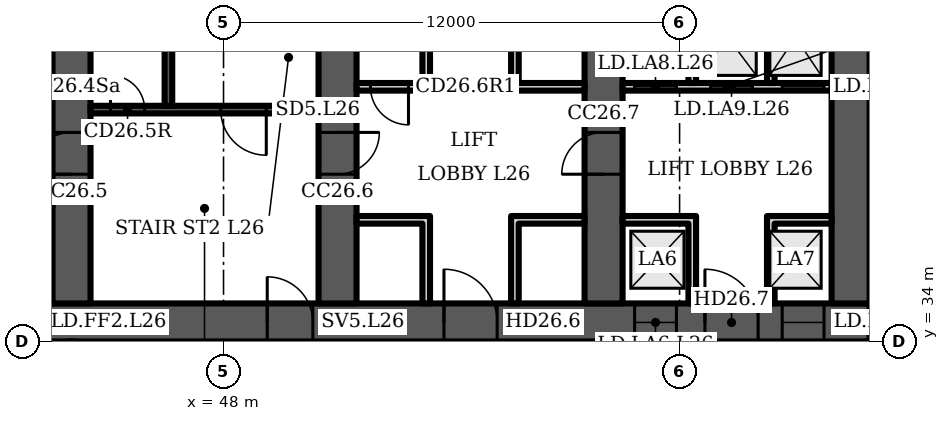
"""IFC4 building model, lengths in metres.
Left out: names, types, materials, properties, quantities, classifications, styles, units other than length and angle.
Written with IfcOpenShell. Run it as: python <this file> out.ifc"""

import sys

from ifc_helpers import new_model, si_unit, direction, frame, frame_2d, origin, place, context, subcontext, project, spatial, polyline, rectangle, outline, extrude, element, fill, save


model = new_model("IFC4")
c1 = context("Model", 3, precision=1e-05, world=origin(), true_north=direction((0.0, 1.0)))
c2 = subcontext(c1, "Body", "Model", "MODEL_VIEW")
j1 = project(units=[si_unit("LENGTHUNIT", "METRE"), si_unit("PLANEANGLEUNIT", "RADIAN")], contexts=[c1])
p1 = place(None, origin())
s1 = spatial("IfcSite", under=j1, at=p1, CompositionType="ELEMENT")
p2 = place(p1, origin())
s2 = spatial("IfcBuilding", under=s1, at=p2, CompositionType="ELEMENT")
p3 = place(p2, frame((0.0, 0.0, 114.7)))
s3 = spatial("IfcBuildingStorey", under=s2, at=p3, CompositionType="ELEMENT", Elevation=114.7)
p4 = place(p3, frame((16.0, 34.5, 0.0), z_axis=(0.0, 0.0, 1.0), x_axis=(1.0, 0.0, 0.0)))
e1 = element("IfcWall", 1, at=p4, inside=s3, PredefinedType="SHEAR", context=c2, shape_type="SweptSolid", body=[
    extrude(rectangle(XDim=49.0, YDim=1.0, at=frame_2d((24.5, 0.0))), origin(), (0.0, 0.0, 1.0), 3.6),
])
p5 = place(p4, frame((1.2, 0.0, 0.0)))
e2 = element("IfcOpeningElement", 2, at=p5, cuts=e1, PredefinedType="OPENING", context=c2, shape_type="SweptSolid", body=[
    extrude(rectangle(XDim=1.1, YDim=2.1, at=frame_2d((0.55, 1.05))), frame((0.0, 0.51, 0.0), z_axis=(0.0, -1.0, 0.0), x_axis=(1.0, 0.0, 0.0)), (0.0, 0.0, 1.0), 1.02),
])
p6 = place(p4, frame((5.083, 0.0, 0.0)))
e3 = element("IfcOpeningElement", 3, at=p6, cuts=e1, PredefinedType="OPENING", context=c2, shape_type="SweptSolid", body=[
    extrude(rectangle(XDim=1.1, YDim=2.1, at=frame_2d((0.55, 1.05))), frame((0.0, 0.51, 0.0), z_axis=(0.0, -1.0, 0.0), x_axis=(1.0, 0.0, 0.0)), (0.0, 0.0, 1.0), 1.02),
])
p7 = place(p4, frame((2.933, 0.0, 0.0)))
e4 = element("IfcOpeningElement", 4, at=p7, cuts=e1, PredefinedType="OPENING", context=c2, shape_type="SweptSolid", body=[
    extrude(rectangle(XDim=1.4, YDim=2.1, at=frame_2d((0.7, 1.05))), frame((0.0, 0.51, 0.0), z_axis=(0.0, -1.0, 0.0), x_axis=(1.0, 0.0, 0.0)), (0.0, 0.0, 1.0), 1.02),
])
p8 = place(p4, frame((7.65, 0.0, 0.0)))
e5 = element("IfcOpeningElement", 5, at=p8, cuts=e1, PredefinedType="OPENING", context=c2, shape_type="SweptSolid", body=[
    extrude(rectangle(XDim=1.2, YDim=2.1, at=frame_2d((0.6, 1.05))), frame((0.0, 0.51, 0.0), z_axis=(0.0, -1.0, 0.0), x_axis=(1.0, 0.0, 0.0)), (0.0, 0.0, 1.0), 1.02),
])
p9 = place(p4, frame((14.817, 0.0, 0.0)))
e6 = element("IfcOpeningElement", 6, at=p9, cuts=e1, PredefinedType="OPENING", context=c2, shape_type="SweptSolid", body=[
    extrude(rectangle(XDim=1.1, YDim=2.1, at=frame_2d((0.55, 1.05))), frame((0.0, 0.51, 0.0), z_axis=(0.0, -1.0, 0.0), x_axis=(1.0, 0.0, 0.0)), (0.0, 0.0, 1.0), 1.02),
])
p10 = place(p4, frame((19.083, 0.0, 0.0)))
e7 = element("IfcOpeningElement", 7, at=p10, cuts=e1, PredefinedType="OPENING", context=c2, shape_type="SweptSolid", body=[
    extrude(rectangle(XDim=1.1, YDim=2.1, at=frame_2d((0.55, 1.05))), frame((0.0, 0.51, 0.0), z_axis=(0.0, -1.0, 0.0), x_axis=(1.0, 0.0, 0.0)), (0.0, 0.0, 1.0), 1.02),
])
p11 = place(p4, frame((16.8, 0.0, 0.0)))
e8 = element("IfcOpeningElement", 8, at=p11, cuts=e1, PredefinedType="OPENING", context=c2, shape_type="SweptSolid", body=[
    extrude(rectangle(XDim=1.4, YDim=2.1, at=frame_2d((0.7, 1.05))), frame((0.0, 0.51, 0.0), z_axis=(0.0, -1.0, 0.0), x_axis=(1.0, 0.0, 0.0)), (0.0, 0.0, 1.0), 1.02),
])
p12 = place(p4, frame((21.817, 0.0, 0.0)))
e9 = element("IfcOpeningElement", 9, at=p12, cuts=e1, PredefinedType="OPENING", context=c2, shape_type="SweptSolid", body=[
    extrude(rectangle(XDim=1.1, YDim=2.1, at=frame_2d((0.55, 1.05))), frame((0.0, 0.51, 0.0), z_axis=(0.0, -1.0, 0.0), x_axis=(1.0, 0.0, 0.0)), (0.0, 0.0, 1.0), 1.02),
])
p13 = place(p4, frame((26.083, 0.0, 0.0)))
e10 = element("IfcOpeningElement", 10, at=p13, cuts=e1, PredefinedType="OPENING", context=c2, shape_type="SweptSolid", body=[
    extrude(rectangle(XDim=1.1, YDim=2.1, at=frame_2d((0.55, 1.05))), frame((0.0, 0.51, 0.0), z_axis=(0.0, -1.0, 0.0), x_axis=(1.0, 0.0, 0.0)), (0.0, 0.0, 1.0), 1.02),
])
p14 = place(p4, frame((33.15, 0.0, 0.0)))
e11 = element("IfcOpeningElement", 11, at=p14, cuts=e1, PredefinedType="OPENING", context=c2, shape_type="SweptSolid", body=[
    extrude(rectangle(XDim=1.2, YDim=2.1, at=frame_2d((0.6, 1.05))), frame((0.0, 0.51, 0.0), z_axis=(0.0, -1.0, 0.0), x_axis=(1.0, 0.0, 0.0)), (0.0, 0.0, 1.0), 1.02),
])
p15 = place(p4, frame((37.8, 0.0, 0.0)))
e12 = element("IfcOpeningElement", 12, at=p15, cuts=e1, PredefinedType="OPENING", context=c2, shape_type="SweptSolid", body=[
    extrude(rectangle(XDim=1.4, YDim=2.1, at=frame_2d((0.7, 1.05))), frame((0.0, 0.51, 0.0), z_axis=(0.0, -1.0, 0.0), x_axis=(1.0, 0.0, 0.0)), (0.0, 0.0, 1.0), 1.02),
])
p16 = place(p4, frame((42.817, 0.0, 0.0)))
e13 = element("IfcOpeningElement", 13, at=p16, cuts=e1, PredefinedType="OPENING", context=c2, shape_type="SweptSolid", body=[
    extrude(rectangle(XDim=1.1, YDim=2.1, at=frame_2d((0.55, 1.05))), frame((0.0, 0.51, 0.0), z_axis=(0.0, -1.0, 0.0), x_axis=(1.0, 0.0, 0.0)), (0.0, 0.0, 1.0), 1.02),
])
p17 = place(p4, frame((46.7, 0.0, 0.0)))
e14 = element("IfcOpeningElement", 14, at=p17, cuts=e1, PredefinedType="OPENING", context=c2, shape_type="SweptSolid", body=[
    extrude(rectangle(XDim=1.1, YDim=2.1, at=frame_2d((0.55, 1.05))), frame((0.0, 0.51, 0.0), z_axis=(0.0, -1.0, 0.0), x_axis=(1.0, 0.0, 0.0)), (0.0, 0.0, 1.0), 1.02),
])
p18 = place(p4, frame((44.667, 0.0, 0.0)))
e15 = element("IfcOpeningElement", 15, at=p18, cuts=e1, PredefinedType="OPENING", context=c2, shape_type="SweptSolid", body=[
    extrude(rectangle(XDim=1.4, YDim=2.1, at=frame_2d((0.7, 1.05))), frame((0.0, 0.51, 0.0), z_axis=(0.0, -1.0, 0.0), x_axis=(1.0, 0.0, 0.0)), (0.0, 0.0, 1.0), 1.02),
])
p19 = place(p3, frame((44.0, 35.0, 0.0), z_axis=(0.0, 0.0, 1.0), x_axis=(0.0, 1.0, 0.0)))
e16 = element("IfcWall", 16, at=p19, inside=s3, PredefinedType="SHEAR", context=c2, shape_type="SweptSolid", body=[
    extrude(rectangle(XDim=14.577, YDim=1.0, at=frame_2d((7.289, 0.0))), origin(), (0.0, 0.0, 1.0), 3.6),
])
p20 = place(p19, frame((3.4, 0.0, 0.0)))
e17 = element("IfcOpeningElement", 17, at=p20, cuts=e16, PredefinedType="OPENING", context=c2, shape_type="SweptSolid", body=[
    extrude(rectangle(XDim=1.1, YDim=2.1, at=frame_2d((0.55, 1.05))), frame((0.0, 0.51, 0.0), z_axis=(0.0, -1.0, 0.0), x_axis=(1.0, 0.0, 0.0)), (0.0, 0.0, 1.0), 1.02),
])
p21 = place(p19, frame((9.8, 0.0, 0.0)))
e18 = element("IfcOpeningElement", 18, at=p21, cuts=e16, PredefinedType="OPENING", context=c2, shape_type="SweptSolid", body=[
    extrude(rectangle(XDim=1.0, YDim=2.1, at=frame_2d((0.5, 1.05))), frame((0.0, 0.51, 0.0), z_axis=(0.0, -1.0, 0.0), x_axis=(1.0, 0.0, 0.0)), (0.0, 0.0, 1.0), 1.02),
])
p22 = place(p3, frame((51.0, 35.0, 0.0), z_axis=(0.0, 0.0, 1.0), x_axis=(0.0, 1.0, 0.0)))
e19 = element("IfcWall", 19, at=p22, inside=s3, PredefinedType="SHEAR", context=c2, shape_type="SweptSolid", body=[
    extrude(rectangle(XDim=13.965, YDim=1.0, at=frame_2d((6.982, 0.0))), origin(), (0.0, 0.0, 1.0), 3.6),
])
p23 = place(p22, frame((3.4, 0.0, 0.0)))
e20 = element("IfcOpeningElement", 20, at=p23, cuts=e19, PredefinedType="OPENING", context=c2, shape_type="SweptSolid", body=[
    extrude(rectangle(XDim=1.1, YDim=2.1, at=frame_2d((0.55, 1.05))), frame((0.0, 0.51, 0.0), z_axis=(0.0, -1.0, 0.0), x_axis=(1.0, 0.0, 0.0)), (0.0, 0.0, 1.0), 1.02),
])
p24 = place(p3, frame((58.0, 35.0, 0.0), z_axis=(0.0, 0.0, 1.0), x_axis=(0.0, 1.0, 0.0)))
e21 = element("IfcWall", 21, at=p24, inside=s3, PredefinedType="SHEAR", context=c2, shape_type="SweptSolid", body=[
    extrude(rectangle(XDim=13.352, YDim=1.0, at=frame_2d((6.676, 0.0))), origin(), (0.0, 0.0, 1.0), 3.6),
])
p25 = place(p24, frame((10.426, 0.0, 0.0)))
e22 = element("IfcOpeningElement", 22, at=p25, cuts=e21, PredefinedType="OPENING", context=c2, shape_type="SweptSolid", body=[
    extrude(rectangle(XDim=1.0, YDim=2.1, at=frame_2d((0.5, 1.05))), frame((0.0, 0.51, 0.0), z_axis=(0.0, -1.0, 0.0), x_axis=(1.0, 0.0, 0.0)), (0.0, 0.0, 1.0), 1.02),
])
p26 = place(p24, frame((3.4, 0.0, 0.0)))
e23 = element("IfcOpeningElement", 23, at=p26, cuts=e21, PredefinedType="OPENING", context=c2, shape_type="SweptSolid", body=[
    extrude(rectangle(XDim=1.1, YDim=2.1, at=frame_2d((0.55, 1.05))), frame((0.0, 0.51, 0.0), z_axis=(0.0, -1.0, 0.0), x_axis=(1.0, 0.0, 0.0)), (0.0, 0.0, 1.0), 1.02),
])
p27 = place(p3, frame((64.5, 35.0, 0.0), z_axis=(0.0, 0.0, 1.0), x_axis=(0.0, 1.0, 0.0)))
e24 = element("IfcWall", 24, at=p27, inside=s3, PredefinedType="SHEAR", context=c2, shape_type="SweptSolid", body=[
    extrude(rectangle(XDim=12.784, YDim=1.0, at=frame_2d((6.392, 0.0))), origin(), (0.0, 0.0, 1.0), 3.6),
])
p28 = place(p3, frame((44.5, 40.1, 0.0), z_axis=(0.0, 0.0, 1.0), x_axis=(1.0, 0.0, 0.0)))
e25 = element("IfcWall", 25, at=p28, inside=s3, PredefinedType="SHEAR", context=c2, shape_type="SweptSolid", body=[
    extrude(rectangle(XDim=6.0, YDim=0.2, at=frame_2d((3.0, 0.0))), origin(), (0.0, 0.0, 1.0), 3.2),
])
p29 = place(p28, frame((3.425, 0.0, 0.0)))
e26 = element("IfcOpeningElement", 26, at=p29, cuts=e25, PredefinedType="OPENING", context=c2, shape_type="SweptSolid", body=[
    extrude(rectangle(XDim=1.2, YDim=2.1, at=frame_2d((0.6, 1.05))), frame((0.0, 0.11, 0.0), z_axis=(0.0, -1.0, 0.0), x_axis=(1.0, 0.0, 0.0)), (0.0, 0.0, 1.0), 0.22),
])
p30 = place(p28, frame((0.525, 0.0, 0.0)))
e27 = element("IfcOpeningElement", 27, at=p30, cuts=e25, PredefinedType="OPENING", context=c2, shape_type="SweptSolid", body=[
    extrude(rectangle(XDim=0.9, YDim=2.1, at=frame_2d((0.45, 1.05))), frame((0.0, 0.11, 0.0), z_axis=(0.0, -1.0, 0.0), x_axis=(1.0, 0.0, 0.0)), (0.0, 0.0, 1.0), 0.22),
])
p31 = place(p3, frame((46.55, 40.2, 0.0), z_axis=(0.0, 0.0, 1.0), x_axis=(0.0, 1.0, 0.0)))
e28 = element("IfcWall", 28, at=p31, inside=s3, PredefinedType="SHEAR", context=c2, shape_type="SweptSolid", body=[
    extrude(rectangle(XDim=7.2, YDim=0.2, at=frame_2d((3.6, 0.0))), origin(), (0.0, 0.0, 1.0), 3.2),
])
p32 = place(p3, frame((51.5, 40.7, 0.0), z_axis=(0.0, 0.0, 1.0), x_axis=(1.0, 0.0, 0.0)))
e29 = element("IfcWall", 29, at=p32, inside=s3, PredefinedType="PARTITIONING", context=c2, shape_type="SweptSolid", body=[
    extrude(rectangle(XDim=6.0, YDim=0.2, at=frame_2d((3.0, 0.0))), origin(), (0.0, 0.0, 1.0), 3.2),
])
p33 = place(p32, frame((0.367, 0.0, 0.0)))
e30 = element("IfcOpeningElement", 30, at=p33, cuts=e29, PredefinedType="OPENING", context=c2, shape_type="SweptSolid", body=[
    extrude(rectangle(XDim=1.0, YDim=2.1, at=frame_2d((0.5, 1.05))), frame((0.0, 0.11, 0.0), z_axis=(0.0, -1.0, 0.0), x_axis=(1.0, 0.0, 0.0)), (0.0, 0.0, 1.0), 0.22),
])
p34 = place(p3, frame((0.0, 0.0, -0.0)))
e31 = element("IfcWall", 31, at=p34, inside=s3, PredefinedType="PARTITIONING", context=c2, shape_type="SweptSolid", body=[
    extrude(outline(polyline([(53.233, 37.1), (51.5, 37.1), (51.5, 37.3), (53.233, 37.3), (53.433, 37.3), (53.433, 35.0), (53.233, 35.0), (53.233, 37.1)])), origin(), (0.0, 0.0, 1.0), 3.2),
])
p35 = place(p3, frame((0.0, 0.0, -0.0)))
e32 = element("IfcWall", 32, at=p35, inside=s3, PredefinedType="PARTITIONING", context=c2, shape_type="SweptSolid", body=[
    extrude(outline(polyline([(55.567, 37.3), (55.767, 37.3), (57.5, 37.3), (57.5, 37.1), (55.767, 37.1), (55.767, 35.0), (55.567, 35.0), (55.567, 37.3)])), origin(), (0.0, 0.0, 1.0), 3.2),
])
p36 = place(p3, frame((0.0, 0.0, -0.0)))
e33 = element("IfcWall", 33, at=p36, inside=s3, PredefinedType="PARTITIONING", context=c2, shape_type="SweptSolid", body=[
    extrude(outline(polyline([(53.233, 40.8), (53.233, 43.8), (53.433, 43.8), (53.433, 40.8), (53.233, 40.8)])), origin(), (0.0, 0.0, 1.0), 3.2),
])
p37 = place(p3, frame((0.0, 0.0, -0.0)))
e34 = element("IfcWall", 34, at=p37, inside=s3, PredefinedType="PARTITIONING", context=c2, shape_type="SweptSolid", body=[
    extrude(outline(polyline([(55.567, 40.8), (55.567, 43.8), (55.767, 43.8), (55.767, 40.8), (55.567, 40.8)])), origin(), (0.0, 0.0, 1.0), 3.2),
])
p38 = place(p3, frame((58.5, 40.7, 0.0), z_axis=(0.0, 0.0, 1.0), x_axis=(1.0, 0.0, 0.0)))
e35 = element("IfcWall", 35, at=p38, inside=s3, PredefinedType="PARTITIONING", context=c2, shape_type="SweptSolid", body=[
    extrude(rectangle(XDim=5.5, YDim=0.2, at=frame_2d((2.75, 0.0))), origin(), (0.0, 0.0, 1.0), 3.2),
])
p39 = place(p38, frame((0.317, 0.0, 0.0)))
e36 = element("IfcOpeningElement", 36, at=p39, cuts=e35, PredefinedType="OPENING", context=c2, shape_type="SweptSolid", body=[
    extrude(rectangle(XDim=1.1, YDim=2.1, at=frame_2d((0.55, 1.05))), frame((0.0, 0.11, 0.0), z_axis=(0.0, -1.0, 0.0), x_axis=(1.0, 0.0, 0.0)), (0.0, 0.0, 1.0), 0.22),
])
p40 = place(p38, frame((2.317, 0.0, 0.0)))
e37 = element("IfcOpeningElement", 37, at=p40, cuts=e35, PredefinedType="OPENING", context=c2, shape_type="SweptSolid", body=[
    extrude(rectangle(XDim=1.1, YDim=2.1, at=frame_2d((0.55, 1.05))), frame((0.0, 0.11, 0.0), z_axis=(0.0, -1.0, 0.0), x_axis=(1.0, 0.0, 0.0)), (0.0, 0.0, 1.0), 0.22),
])
p41 = place(p38, frame((4.2, 0.0, 0.0)))
e38 = element("IfcOpeningElement", 38, at=p41, cuts=e35, PredefinedType="OPENING", context=c2, shape_type="SweptSolid", body=[
    extrude(rectangle(XDim=1.1, YDim=2.1, at=frame_2d((0.55, 1.05))), frame((0.0, 0.11, 0.0), z_axis=(0.0, -1.0, 0.0), x_axis=(1.0, 0.0, 0.0)), (0.0, 0.0, 1.0), 0.22),
])
p42 = place(p3, frame((0.0, 0.0, -0.0)))
e39 = element("IfcWall", 39, at=p42, inside=s3, PredefinedType="PARTITIONING", context=c2, shape_type="SweptSolid", body=[
    extrude(outline(polyline([(60.233, 37.1), (58.5, 37.1), (58.5, 37.3), (60.233, 37.3), (60.433, 37.3), (60.433, 35.0), (60.233, 35.0), (60.233, 37.1)])), origin(), (0.0, 0.0, 1.0), 3.2),
])
p43 = place(p3, frame((0.0, 0.0, -0.0)))
e40 = element("IfcWall", 40, at=p43, inside=s3, PredefinedType="PARTITIONING", context=c2, shape_type="SweptSolid", body=[
    extrude(outline(polyline([(62.3, 37.3), (62.5, 37.3), (64.0, 37.3), (64.0, 37.1), (62.5, 37.1), (62.5, 35.0), (62.3, 35.0), (62.3, 37.3)])), origin(), (0.0, 0.0, 1.0), 3.2),
])
p44 = place(p3, frame((0.0, 0.0, -0.0)))
e41 = element("IfcWall", 41, at=p44, inside=s3, PredefinedType="PARTITIONING", context=c2, shape_type="SweptSolid", body=[
    extrude(outline(polyline([(60.433, 40.8), (60.233, 40.8), (60.233, 43.8), (58.5, 43.8), (58.5, 44.0), (64.0, 44.0), (64.0, 43.8), (62.5, 43.8), (62.5, 40.8), (62.3, 40.8), (62.3, 43.8), (60.433, 43.8), (60.433, 40.8)])), origin(), (0.0, 0.0, 1.0), 3.2),
])
p45 = place(p29, origin())
e42 = element("IfcDoor", 42, at=p45, inside=s3, OperationType="SINGLE_SWING_RIGHT", PredefinedType="DOOR", context=c2, shape_type="SweptSolid", body=[
    extrude(rectangle(XDim=1.2, YDim=2.1, at=frame_2d((0.6, 1.05))), frame((0.0, 0.025, 0.0), z_axis=(0.0, -1.0, 0.0), x_axis=(1.0, 0.0, 0.0)), (0.0, 0.0, 1.0), 0.05),
])
fill(e26, e42)
p46 = place(p30, origin())
e43 = element("IfcDoor", 43, at=p46, inside=s3, OperationType="SINGLE_SWING_LEFT", PredefinedType="DOOR", context=c2, shape_type="SweptSolid", body=[
    extrude(rectangle(XDim=0.9, YDim=2.1, at=frame_2d((0.45, 1.05))), frame((0.0, 0.025, 0.0), z_axis=(0.0, -1.0, 0.0), x_axis=(1.0, 0.0, 0.0)), (0.0, 0.0, 1.0), 0.05),
])
fill(e27, e43)
p47 = place(p14, origin())
e44 = element("IfcDoor", 44, at=p47, inside=s3, OperationType="SINGLE_SWING_LEFT", PredefinedType="DOOR", context=c2, shape_type="SweptSolid", body=[
    extrude(rectangle(XDim=1.2, YDim=2.1, at=frame_2d((0.6, 1.05))), frame((0.0, 0.025, 0.0), z_axis=(0.0, -1.0, 0.0), x_axis=(1.0, 0.0, 0.0)), (0.0, 0.0, 1.0), 0.05),
])
fill(e11, e44)
p48 = place(p15, origin())
e45 = element("IfcDoor", 45, at=p48, inside=s3, OperationType="DOUBLE_DOOR_SINGLE_SWING", PredefinedType="DOOR", context=c2, shape_type="SweptSolid", body=[
    extrude(rectangle(XDim=1.4, YDim=2.1, at=frame_2d((0.7, 1.05))), frame((0.0, 0.025, 0.0), z_axis=(0.0, -1.0, 0.0), x_axis=(1.0, 0.0, 0.0)), (0.0, 0.0, 1.0), 0.05),
])
fill(e12, e45)
p49 = place(p33, origin())
e46 = element("IfcDoor", 46, at=p49, inside=s3, OperationType="SINGLE_SWING_RIGHT", PredefinedType="DOOR", context=c2, shape_type="SweptSolid", body=[
    extrude(rectangle(XDim=1.0, YDim=2.1, at=frame_2d((0.5, 1.05))), frame((0.0, 0.025, 0.0), z_axis=(0.0, -1.0, 0.0), x_axis=(1.0, 0.0, 0.0)), (0.0, 0.0, 1.0), 0.05),
])
fill(e30, e46)
p50 = place(p16, origin())
e47 = element("IfcDoor", 47, at=p50, inside=s3, OperationType="DOUBLE_DOOR_SLIDING", PredefinedType="DOOR", context=c2, shape_type="SweptSolid", body=[
    extrude(rectangle(XDim=1.1, YDim=2.1, at=frame_2d((0.55, 1.05))), frame((0.0, 0.025, 0.0), z_axis=(0.0, -1.0, 0.0), x_axis=(1.0, 0.0, 0.0)), (0.0, 0.0, 1.0), 0.05),
])
fill(e13, e47)
p51 = place(p17, origin())
e48 = element("IfcDoor", 48, at=p51, inside=s3, OperationType="DOUBLE_DOOR_SLIDING", PredefinedType="DOOR", context=c2, shape_type="SweptSolid", body=[
    extrude(rectangle(XDim=1.1, YDim=2.1, at=frame_2d((0.55, 1.05))), frame((0.0, 0.025, 0.0), z_axis=(0.0, -1.0, 0.0), x_axis=(1.0, 0.0, 0.0)), (0.0, 0.0, 1.0), 0.05),
])
fill(e14, e48)
p52 = place(p18, origin())
e49 = element("IfcDoor", 49, at=p52, inside=s3, OperationType="DOUBLE_DOOR_SINGLE_SWING", PredefinedType="DOOR", context=c2, shape_type="SweptSolid", body=[
    extrude(rectangle(XDim=1.4, YDim=2.1, at=frame_2d((0.7, 1.05))), frame((0.0, 0.025, 0.0), z_axis=(0.0, -1.0, 0.0), x_axis=(1.0, 0.0, 0.0)), (0.0, 0.0, 1.0), 0.05),
])
fill(e15, e49)
p53 = place(p39, origin())
e50 = element("IfcDoor", 50, at=p53, inside=s3, OperationType="DOUBLE_DOOR_SLIDING", PredefinedType="DOOR", context=c2, shape_type="SweptSolid", body=[
    extrude(rectangle(XDim=1.1, YDim=2.1, at=frame_2d((0.55, 1.05))), frame((0.0, 0.025, 0.0), z_axis=(0.0, -1.0, 0.0), x_axis=(1.0, 0.0, 0.0)), (0.0, 0.0, 1.0), 0.05),
])
fill(e36, e50)
p54 = place(p40, origin())
e51 = element("IfcDoor", 51, at=p54, inside=s3, OperationType="DOUBLE_DOOR_SLIDING", PredefinedType="DOOR", context=c2, shape_type="SweptSolid", body=[
    extrude(rectangle(XDim=1.1, YDim=2.1, at=frame_2d((0.55, 1.05))), frame((0.0, 0.025, 0.0), z_axis=(0.0, -1.0, 0.0), x_axis=(1.0, 0.0, 0.0)), (0.0, 0.0, 1.0), 0.05),
])
fill(e37, e51)
p55 = place(p41, origin())
e52 = element("IfcDoor", 52, at=p55, inside=s3, OperationType="DOUBLE_DOOR_SLIDING", PredefinedType="DOOR", context=c2, shape_type="SweptSolid", body=[
    extrude(rectangle(XDim=1.1, YDim=2.1, at=frame_2d((0.55, 1.05))), frame((0.0, 0.025, 0.0), z_axis=(0.0, -1.0, 0.0), x_axis=(1.0, 0.0, 0.0)), (0.0, 0.0, 1.0), 0.05),
])
fill(e38, e52)
p56 = place(p20, origin())
e53 = element("IfcDoor", 53, at=p56, inside=s3, OperationType="SINGLE_SWING_LEFT", PredefinedType="DOOR", context=c2, shape_type="SweptSolid", body=[
    extrude(rectangle(XDim=1.1, YDim=2.1, at=frame_2d((0.55, 1.05))), frame((0.0, 0.025, 0.0), z_axis=(0.0, -1.0, 0.0), x_axis=(1.0, 0.0, 0.0)), (0.0, 0.0, 1.0), 0.05),
])
fill(e17, e53)
p57 = place(p23, origin())
e54 = element("IfcDoor", 54, at=p57, inside=s3, OperationType="SINGLE_SWING_RIGHT", PredefinedType="DOOR", context=c2, shape_type="SweptSolid", body=[
    extrude(rectangle(XDim=1.1, YDim=2.1, at=frame_2d((0.55, 1.05))), frame((0.0, 0.025, 0.0), z_axis=(0.0, -1.0, 0.0), x_axis=(1.0, 0.0, 0.0)), (0.0, 0.0, 1.0), 0.05),
])
fill(e20, e54)
p58 = place(p26, origin())
e55 = element("IfcDoor", 55, at=p58, inside=s3, OperationType="SINGLE_SWING_LEFT", PredefinedType="DOOR", context=c2, shape_type="SweptSolid", body=[
    extrude(rectangle(XDim=1.1, YDim=2.1, at=frame_2d((0.55, 1.05))), frame((0.0, 0.025, 0.0), z_axis=(0.0, -1.0, 0.0), x_axis=(1.0, 0.0, 0.0)), (0.0, 0.0, 1.0), 0.05),
])
fill(e23, e55)
save(model, sys.argv[1])
